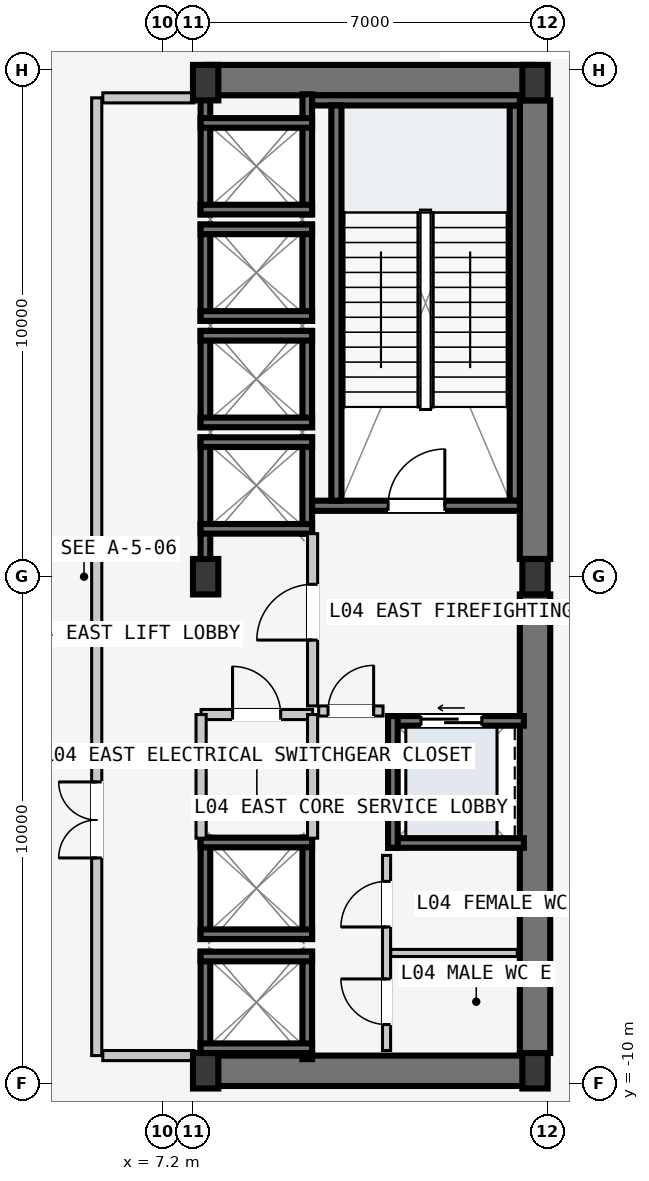
"""IFC4 building model, lengths in metres.
Left out: names, types, materials, properties, quantities, classifications, styles, units other than length and angle.
Written with IfcOpenShell. Run it as: python <this file> out.ifc"""

import sys

from ifc_helpers import new_model, si_unit, direction, frame, frame_2d, origin, origin_2d, place, context, subcontext, project, spatial, rectangle, i_section, extrude, element, fill, save


model = new_model("IFC4")
c1 = context("Model", 3, precision=1e-05, world=origin(), true_north=direction((0.0, 1.0)))
c2 = subcontext(c1, "Body", "Model", "MODEL_VIEW")
j1 = project(units=[si_unit("LENGTHUNIT", "METRE"), si_unit("PLANEANGLEUNIT", "RADIAN")], contexts=[c1])
p1 = place(None, origin())
s1 = spatial("IfcSite", under=j1, at=p1, CompositionType="ELEMENT")
p2 = place(p1, origin())
s2 = spatial("IfcBuilding", under=s1, at=p2, CompositionType="ELEMENT")
p3 = place(p2, frame((0.0, 0.0, 19.2)))
s3 = spatial("IfcBuildingStorey", under=s2, at=p3, CompositionType="ELEMENT", Elevation=19.2)
for number, where, z_axis, x_axis in (
    (1, (8.07, -9.75, -0.22), (0.0, 0.0, 1.0), (1.0, 0.0, 0.0)),
    (2, (8.07, 9.8, -0.22), (0.0, 0.0, 1.0), (1.0, 0.0, 0.0)),
):
    element("IfcWall", number, at=place(p3, frame(where, z_axis=z_axis, x_axis=x_axis)), inside=s3, PredefinedType="SHEAR", context=c2, shape_type="SweptSolid", body=[
        extrude(rectangle(XDim=6.46, YDim=0.6, at=frame_2d((3.23, 0.0))), origin(), (0.0, 0.0, 1.0), 4.82),
    ])
for number, where, z_axis, x_axis in (
    (3, (14.55, -9.4, -0.22), (0.0, 0.0, 1.0), (0.0, 1.0, 0.0)),
    (4, (14.55, 0.35, -0.22), (0.0, 0.0, 1.0), (0.0, 1.0, 0.0)),
):
    element("IfcWall", number, at=place(p3, frame(where, z_axis=z_axis, x_axis=x_axis)), inside=s3, PredefinedType="SHEAR", context=c2, shape_type="SweptSolid", body=[
        extrude(rectangle(XDim=9.05, YDim=0.6, at=frame_2d((4.525, 0.0))), origin(), (0.0, 0.0, 1.0), 4.82),
    ])
p4 = place(p3, frame((14.15, 1.5, -0.22), z_axis=(0.0, 0.0, 1.0), x_axis=(0.0, 1.0, 0.0)))
e5 = element("IfcWall", 5, at=p4, inside=s3, PredefinedType="SOLIDWALL", context=c2, shape_type="SweptSolid", body=[
    extrude(rectangle(XDim=7.8, YDim=0.2, at=frame_2d((3.9, 0.0))), origin(), (0.0, 0.0, 1.0), 4.82),
])
p5 = place(p3, frame((10.15, 1.4, -0.22), z_axis=(0.0, 0.0, 1.0), x_axis=(1.0, 0.0, 0.0)))
e6 = element("IfcWall", 6, at=p5, inside=s3, PredefinedType="SOLIDWALL", context=c2, shape_type="SweptSolid", body=[
    extrude(rectangle(XDim=4.1, YDim=0.2, at=frame_2d((2.05, 0.0))), origin(), (0.0, 0.0, 1.0), 4.82),
])
p6 = place(p5, frame((1.5, 0.0, 0.22)))
e7 = element("IfcOpeningElement", 7, at=p6, cuts=e6, PredefinedType="OPENING", context=c2, shape_type="SweptSolid", body=[
    extrude(rectangle(XDim=1.12, YDim=2.18, at=frame_2d((0.56, 1.09))), frame((0.0, 0.11, 0.0), z_axis=(0.0, -1.0, 0.0), x_axis=(1.0, 0.0, 0.0)), (0.0, 0.0, 1.0), 0.22),
])
p7 = place(p3, frame((10.15, 9.4, -0.22), z_axis=(0.0, 0.0, 1.0), x_axis=(1.0, 0.0, 0.0)))
e8 = element("IfcWall", 8, at=p7, inside=s3, PredefinedType="SOLIDWALL", context=c2, shape_type="SweptSolid", body=[
    extrude(rectangle(XDim=4.1, YDim=0.2, at=frame_2d((2.05, 0.0))), origin(), (0.0, 0.0, 1.0), 4.82),
])
p8 = place(p3, frame((10.63, 1.5, -0.22), z_axis=(0.0, 0.0, 1.0), x_axis=(0.0, 1.0, 0.0)))
e9 = element("IfcWall", 9, at=p8, inside=s3, PredefinedType="SOLIDWALL", context=c2, shape_type="SweptSolid", body=[
    extrude(rectangle(XDim=7.8, YDim=0.2, at=frame_2d((3.9, 0.0))), origin(), (0.0, 0.0, 1.0), 4.82),
])
for number, where, z_axis, x_axis in (
    (10, (8.05, -9.75, 0.0), (0.0, 0.0, 1.0), (1.0, 0.0, 0.0)),
    (11, (8.05, 0.0, 0.0), (0.0, 0.0, 1.0), (1.0, 0.0, 0.0)),
    (12, (8.05, 9.75, 0.0), (0.0, 0.0, 1.0), (1.0, 0.0, 0.0)),
    (13, (14.55, -9.75, 0.0), (0.0, 0.0, 1.0), (1.0, 0.0, 0.0)),
    (14, (14.55, 0.0, 0.0), (0.0, 0.0, 1.0), (1.0, 0.0, 0.0)),
    (15, (14.55, 9.75, 0.0), (0.0, 0.0, 1.0), (1.0, 0.0, 0.0)),
):
    element("IfcColumn", number, at=place(p3, frame(where, z_axis=z_axis, x_axis=x_axis)), inside=s3, PredefinedType="COLUMN", context=c2, shape_type="SweptSolid", body=[
        extrude(i_section(OverallWidth=0.5, OverallDepth=0.7, WebThickness=0.028, FlangeThickness=0.045, at=origin_2d()), origin(), (0.0, 0.0, 1.0), 4.8),
    ])
p9 = place(p3, frame((8.045, 0.21, -0.22), z_axis=(0.0, 0.0, 1.0), x_axis=(0.0, 1.0, 0.0)))
e16 = element("IfcWall", 16, at=p9, inside=s3, PredefinedType="SOLIDWALL", context=c2, shape_type="SweptSolid", body=[
    extrude(rectangle(XDim=2.54, YDim=0.19, at=frame_2d((1.27, 0.0))), origin(), (0.0, 0.0, 1.0), 4.82),
])
p10 = place(p3, frame((10.055, 0.85, -0.22), z_axis=(0.0, 0.0, 1.0), x_axis=(0.0, 1.0, 0.0)))
e17 = element("IfcWall", 17, at=p10, inside=s3, PredefinedType="SOLIDWALL", context=c2, shape_type="SweptSolid", body=[
    extrude(rectangle(XDim=1.9, YDim=0.19, at=frame_2d((0.95, 0.0))), origin(), (0.0, 0.0, 1.0), 4.82),
])
for number, where, z_axis, x_axis in (
    (18, (7.95, 2.655, -0.22), (0.0, 0.0, 1.0), (1.0, 0.0, 0.0)),
    (19, (7.95, 0.945, -0.22), (0.0, 0.0, 1.0), (1.0, 0.0, 0.0)),
):
    element("IfcWall", number, at=place(p3, frame(where, z_axis=z_axis, x_axis=x_axis)), inside=s3, PredefinedType="SOLIDWALL", context=c2, shape_type="SweptSolid", body=[
        extrude(rectangle(XDim=2.2, YDim=0.19, at=frame_2d((1.1, 0.0))), origin(), (0.0, 0.0, 1.0), 4.82),
    ])
for number, where, z_axis, x_axis in (
    (20, (8.045, 2.95, -0.22), (0.0, 0.0, 1.0), (0.0, 1.0, 0.0)),
    (21, (10.055, 2.95, -0.22), (0.0, 0.0, 1.0), (0.0, 1.0, 0.0)),
):
    element("IfcWall", number, at=place(p3, frame(where, z_axis=z_axis, x_axis=x_axis)), inside=s3, PredefinedType="SOLIDWALL", context=c2, shape_type="SweptSolid", body=[
        extrude(rectangle(XDim=1.9, YDim=0.19, at=frame_2d((0.95, 0.0))), origin(), (0.0, 0.0, 1.0), 4.82),
    ])
for number, where, z_axis, x_axis in (
    (22, (7.95, 4.755, -0.22), (0.0, 0.0, 1.0), (1.0, 0.0, 0.0)),
    (23, (7.95, 3.045, -0.22), (0.0, 0.0, 1.0), (1.0, 0.0, 0.0)),
):
    element("IfcWall", number, at=place(p3, frame(where, z_axis=z_axis, x_axis=x_axis)), inside=s3, PredefinedType="SOLIDWALL", context=c2, shape_type="SweptSolid", body=[
        extrude(rectangle(XDim=2.2, YDim=0.19, at=frame_2d((1.1, 0.0))), origin(), (0.0, 0.0, 1.0), 4.82),
    ])
for number, where, z_axis, x_axis in (
    (24, (8.045, 5.05, -0.22), (0.0, 0.0, 1.0), (0.0, 1.0, 0.0)),
    (25, (10.055, 5.05, -0.22), (0.0, 0.0, 1.0), (0.0, 1.0, 0.0)),
):
    element("IfcWall", number, at=place(p3, frame(where, z_axis=z_axis, x_axis=x_axis)), inside=s3, PredefinedType="SOLIDWALL", context=c2, shape_type="SweptSolid", body=[
        extrude(rectangle(XDim=1.9, YDim=0.19, at=frame_2d((0.95, 0.0))), origin(), (0.0, 0.0, 1.0), 4.82),
    ])
for number, where, z_axis, x_axis in (
    (26, (7.95, 6.855, -0.22), (0.0, 0.0, 1.0), (1.0, 0.0, 0.0)),
    (27, (7.95, 5.145, -0.22), (0.0, 0.0, 1.0), (1.0, 0.0, 0.0)),
):
    element("IfcWall", number, at=place(p3, frame(where, z_axis=z_axis, x_axis=x_axis)), inside=s3, PredefinedType="SOLIDWALL", context=c2, shape_type="SweptSolid", body=[
        extrude(rectangle(XDim=2.2, YDim=0.19, at=frame_2d((1.1, 0.0))), origin(), (0.0, 0.0, 1.0), 4.82),
    ])
for number, where, z_axis, x_axis in (
    (28, (8.045, 7.15, -0.22), (0.0, 0.0, 1.0), (0.0, 1.0, 0.0)),
    (29, (10.055, 7.15, -0.22), (0.0, 0.0, 1.0), (0.0, 1.0, 0.0)),
):
    element("IfcWall", number, at=place(p3, frame(where, z_axis=z_axis, x_axis=x_axis)), inside=s3, PredefinedType="SOLIDWALL", context=c2, shape_type="SweptSolid", body=[
        extrude(rectangle(XDim=2.37, YDim=0.19, at=frame_2d((1.185, 0.0))), origin(), (0.0, 0.0, 1.0), 4.82),
    ])
for number, where, z_axis, x_axis in (
    (30, (7.95, 8.955, -0.22), (0.0, 0.0, 1.0), (1.0, 0.0, 0.0)),
    (31, (7.95, 7.245, -0.22), (0.0, 0.0, 1.0), (1.0, 0.0, 0.0)),
):
    element("IfcWall", number, at=place(p3, frame(where, z_axis=z_axis, x_axis=x_axis)), inside=s3, PredefinedType="SOLIDWALL", context=c2, shape_type="SweptSolid", body=[
        extrude(rectangle(XDim=2.2, YDim=0.19, at=frame_2d((1.1, 0.0))), origin(), (0.0, 0.0, 1.0), 4.82),
    ])
for number, where, z_axis, x_axis in (
    (32, (8.045, -9.52, -0.22), (0.0, 0.0, 1.0), (0.0, 1.0, 0.0)),
    (33, (10.055, -9.52, -0.22), (0.0, 0.0, 1.0), (0.0, 1.0, 0.0)),
):
    element("IfcWall", number, at=place(p3, frame(where, z_axis=z_axis, x_axis=x_axis)), inside=s3, PredefinedType="SOLIDWALL", context=c2, shape_type="SweptSolid", body=[
        extrude(rectangle(XDim=2.12, YDim=0.19, at=frame_2d((1.06, 0.0))), origin(), (0.0, 0.0, 1.0), 4.82),
    ])
for number, where, z_axis, x_axis in (
    (34, (7.95, -7.495, -0.22), (0.0, 0.0, 1.0), (1.0, 0.0, 0.0)),
    (35, (7.95, -9.305, -0.22), (0.0, 0.0, 1.0), (1.0, 0.0, 0.0)),
):
    element("IfcWall", number, at=place(p3, frame(where, z_axis=z_axis, x_axis=x_axis)), inside=s3, PredefinedType="SOLIDWALL", context=c2, shape_type="SweptSolid", body=[
        extrude(rectangle(XDim=2.2, YDim=0.19, at=frame_2d((1.1, 0.0))), origin(), (0.0, 0.0, 1.0), 4.82),
    ])
for number, where, z_axis, x_axis in (
    (36, (8.045, -7.15, -0.22), (0.0, 0.0, 1.0), (0.0, 1.0, 0.0)),
    (37, (10.055, -7.15, -0.22), (0.0, 0.0, 1.0), (0.0, 1.0, 0.0)),
):
    element("IfcWall", number, at=place(p3, frame(where, z_axis=z_axis, x_axis=x_axis)), inside=s3, PredefinedType="SOLIDWALL", context=c2, shape_type="SweptSolid", body=[
        extrude(rectangle(XDim=2.0, YDim=0.19, at=frame_2d((1.0, 0.0))), origin(), (0.0, 0.0, 1.0), 4.82),
    ])
for number, where, z_axis, x_axis in (
    (38, (7.95, -5.245, -0.22), (0.0, 0.0, 1.0), (1.0, 0.0, 0.0)),
    (39, (7.95, -7.055, -0.22), (0.0, 0.0, 1.0), (1.0, 0.0, 0.0)),
):
    element("IfcWall", number, at=place(p3, frame(where, z_axis=z_axis, x_axis=x_axis)), inside=s3, PredefinedType="SOLIDWALL", context=c2, shape_type="SweptSolid", body=[
        extrude(rectangle(XDim=2.2, YDim=0.19, at=frame_2d((1.1, 0.0))), origin(), (0.0, 0.0, 1.0), 4.82),
    ])
p11 = place(p3, frame((11.65, -2.845, -0.22), z_axis=(0.0, 0.0, 1.0), x_axis=(1.0, 0.0, 0.0)))
e40 = element("IfcWall", 40, at=p11, inside=s3, PredefinedType="SOLIDWALL", context=c2, shape_type="SweptSolid", body=[
    extrude(rectangle(XDim=2.68, YDim=0.19, at=frame_2d((1.34, 0.0))), origin(), (0.0, 0.0, 1.0), 4.82),
])
p12 = place(p11, frame((0.65, 0.0, 0.22)))
e41 = element("IfcOpeningElement", 41, at=p12, cuts=e40, PredefinedType="OPENING", context=c2, shape_type="SweptSolid", body=[
    extrude(rectangle(XDim=1.2, YDim=2.2, at=frame_2d((0.6, 1.1))), frame((0.0, 0.105, 0.0), z_axis=(0.0, -1.0, 0.0), x_axis=(1.0, 0.0, 0.0)), (0.0, 0.0, 1.0), 0.21),
])
p13 = place(p3, frame((11.65, -5.255, -0.22), z_axis=(0.0, 0.0, 1.0), x_axis=(1.0, 0.0, 0.0)))
e42 = element("IfcWall", 42, at=p13, inside=s3, PredefinedType="SOLIDWALL", context=c2, shape_type="SweptSolid", body=[
    extrude(rectangle(XDim=2.68, YDim=0.19, at=frame_2d((1.34, 0.0))), origin(), (0.0, 0.0, 1.0), 4.82),
])
p14 = place(p3, frame((11.745, -5.35, -0.22), z_axis=(0.0, 0.0, 1.0), x_axis=(0.0, 1.0, 0.0)))
e43 = element("IfcWall", 43, at=p14, inside=s3, PredefinedType="SOLIDWALL", context=c2, shape_type="SweptSolid", body=[
    extrude(rectangle(XDim=2.6, YDim=0.19, at=frame_2d((1.3, 0.0))), origin(), (0.0, 0.0, 1.0), 4.82),
])
p15 = place(p3, frame((5.9, -9.45, 0.0), z_axis=(0.0, 0.0, 1.0), x_axis=(0.0, 1.0, 0.0)))
e44 = element("IfcWall", 44, at=p15, inside=s3, PredefinedType="PARTITIONING", context=c2, shape_type="SweptSolid", body=[
    extrude(rectangle(XDim=18.9, YDim=0.2, at=frame_2d((9.45, 0.0))), origin(), (0.0, 0.0, 1.0), 4.6),
])
p16 = place(p15, frame((3.9, 0.0, 0.0)))
e45 = element("IfcOpeningElement", 45, at=p16, cuts=e44, PredefinedType="OPENING", context=c2, shape_type="SweptSolid", body=[
    extrude(rectangle(XDim=1.5, YDim=2.2, at=frame_2d((0.75, 1.1))), frame((0.0, 0.11, 0.0), z_axis=(0.0, -1.0, 0.0), x_axis=(1.0, 0.0, 0.0)), (0.0, 0.0, 1.0), 0.22),
])
for number, where, z_axis, x_axis in (
    (46, (6.02, -9.45, 0.0), (0.0, 0.0, 1.0), (1.0, 0.0, 0.0)),
    (47, (6.02, 9.45, 0.0), (0.0, 0.0, 1.0), (1.0, 0.0, 0.0)),
):
    element("IfcWall", number, at=place(p3, frame(where, z_axis=z_axis, x_axis=x_axis)), inside=s3, PredefinedType="PARTITIONING", context=c2, shape_type="SweptSolid", body=[
        extrude(rectangle(XDim=1.8, YDim=0.2, at=frame_2d((0.9, 0.0))), origin(), (0.0, 0.0, 1.0), 2.92),
    ])
p17 = place(p3, frame((10.16, -2.55, 0.0), z_axis=(0.0, 0.0, 1.0), x_axis=(0.0, 1.0, 0.0)))
e48 = element("IfcWall", 48, at=p17, inside=s3, PredefinedType="PARTITIONING", context=c2, shape_type="SweptSolid", body=[
    extrude(rectangle(XDim=3.4, YDim=0.2, at=frame_2d((1.7, 0.0))), origin(), (0.0, 0.0, 1.0), 4.6),
])
p18 = place(p17, frame((1.3, 0.0, 0.0)))
e49 = element("IfcOpeningElement", 49, at=p18, cuts=e48, PredefinedType="OPENING", context=c2, shape_type="SweptSolid", body=[
    extrude(rectangle(XDim=1.1, YDim=2.15, at=frame_2d((0.55, 1.075))), frame((0.0, 0.11, 0.0), z_axis=(0.0, -1.0, 0.0), x_axis=(1.0, 0.0, 0.0)), (0.0, 0.0, 1.0), 0.22),
])
p19 = place(p3, frame((10.28, -2.65, 0.0), z_axis=(0.0, 0.0, 1.0), x_axis=(1.0, 0.0, 0.0)))
e50 = element("IfcWall", 50, at=p19, inside=s3, PredefinedType="PARTITIONING", context=c2, shape_type="SweptSolid", body=[
    extrude(rectangle(XDim=1.27, YDim=0.2, at=frame_2d((0.635, 0.0))), origin(), (0.0, 0.0, 1.0), 4.6),
])
p20 = place(p19, frame((0.185, 0.0, 0.0)))
e51 = element("IfcOpeningElement", 51, at=p20, cuts=e50, PredefinedType="OPENING", context=c2, shape_type="SweptSolid", body=[
    extrude(rectangle(XDim=0.9, YDim=2.15, at=frame_2d((0.45, 1.075))), frame((0.0, 0.11, 0.0), z_axis=(0.0, -1.0, 0.0), x_axis=(1.0, 0.0, 0.0)), (0.0, 0.0, 1.0), 0.22),
])
p21 = place(p3, frame((7.96, -2.72, 0.0), z_axis=(0.0, 0.0, 1.0), x_axis=(1.0, 0.0, 0.0)))
e52 = element("IfcWall", 52, at=p21, inside=s3, PredefinedType="PARTITIONING", context=c2, shape_type="SweptSolid", body=[
    extrude(rectangle(XDim=2.2, YDim=0.2, at=frame_2d((1.1, 0.0))), origin(), (0.0, 0.0, 1.0), 4.6),
])
p22 = place(p21, frame((0.62, 0.0, 0.0)))
e53 = element("IfcOpeningElement", 53, at=p22, cuts=e52, PredefinedType="OPENING", context=c2, shape_type="SweptSolid", body=[
    extrude(rectangle(XDim=0.95, YDim=2.1, at=frame_2d((0.475, 1.05))), frame((0.0, 0.11, 0.0), z_axis=(0.0, -1.0, 0.0), x_axis=(1.0, 0.0, 0.0)), (0.0, 0.0, 1.0), 0.22),
])
for number, where, z_axis, x_axis in (
    (54, (7.96, -5.16, 0.0), (0.0, 0.0, 1.0), (0.0, 1.0, 0.0)),
    (55, (10.16, -5.16, 0.0), (0.0, 0.0, 1.0), (0.0, 1.0, 0.0)),
):
    element("IfcWall", number, at=place(p3, frame(where, z_axis=z_axis, x_axis=x_axis)), inside=s3, PredefinedType="PARTITIONING", context=c2, shape_type="SweptSolid", body=[
        extrude(rectangle(XDim=2.44, YDim=0.2, at=frame_2d((1.22, 0.0))), origin(), (0.0, 0.0, 1.0), 4.6),
    ])
p23 = place(p3, frame((11.7, -7.425, 0.0), z_axis=(0.0, 0.0, 1.0), x_axis=(1.0, 0.0, 0.0)))
e56 = element("IfcWall", 56, at=p23, inside=s3, PredefinedType="PARTITIONING", context=c2, shape_type="SweptSolid", body=[
    extrude(rectangle(XDim=2.5, YDim=0.14, at=frame_2d((1.25, 0.0))), origin(), (0.0, 0.0, 1.0), 4.6),
])
p24 = place(p3, frame((11.62, -9.35, 0.0), z_axis=(0.0, 0.0, 1.0), x_axis=(0.0, 1.0, 0.0)))
e57 = element("IfcWall", 57, at=p24, inside=s3, PredefinedType="PARTITIONING", context=c2, shape_type="SweptSolid", body=[
    extrude(rectangle(XDim=3.85, YDim=0.16, at=frame_2d((1.925, 0.0))), origin(), (0.0, 0.0, 1.0), 4.6),
])
p25 = place(p24, frame((0.512, 0.0, 0.0)))
e58 = element("IfcOpeningElement", 58, at=p25, cuts=e57, PredefinedType="OPENING", context=c2, shape_type="SweptSolid", body=[
    extrude(rectangle(XDim=0.9, YDim=2.15, at=frame_2d((0.45, 1.075))), frame((0.0, 0.09, 0.0), z_axis=(0.0, -1.0, 0.0), x_axis=(1.0, 0.0, 0.0)), (0.0, 0.0, 1.0), 0.18),
])
p26 = place(p24, frame((2.438, 0.0, 0.0)))
e59 = element("IfcOpeningElement", 59, at=p26, cuts=e57, PredefinedType="OPENING", context=c2, shape_type="SweptSolid", body=[
    extrude(rectangle(XDim=0.9, YDim=2.15, at=frame_2d((0.45, 1.075))), frame((0.0, 0.09, 0.0), z_axis=(0.0, -1.0, 0.0), x_axis=(1.0, 0.0, 0.0)), (0.0, 0.0, 1.0), 0.18),
])
p27 = place(p6, origin())
e60 = element("IfcDoor", 60, at=p27, inside=s3, OperationType="SINGLE_SWING_RIGHT", PredefinedType="DOOR", context=c2, shape_type="SweptSolid", body=[
    extrude(rectangle(XDim=1.12, YDim=2.18, at=frame_2d((0.56, 1.09))), frame((0.0, 0.025, 0.0), z_axis=(0.0, -1.0, 0.0), x_axis=(1.0, 0.0, 0.0)), (0.0, 0.0, 1.0), 0.05),
])
fill(e7, e60)
p28 = place(p12, origin())
e61 = element("IfcDoor", 61, at=p28, inside=s3, OperationType="SLIDING_TO_LEFT", PredefinedType="DOOR", context=c2, shape_type="SweptSolid", body=[
    extrude(rectangle(XDim=1.2, YDim=2.2, at=frame_2d((0.6, 1.1))), frame((0.0, 0.025, 0.0), z_axis=(0.0, -1.0, 0.0), x_axis=(1.0, 0.0, 0.0)), (0.0, 0.0, 1.0), 0.05),
])
fill(e41, e61)
p29 = place(p16, origin())
e62 = element("IfcDoor", 62, at=p29, inside=s3, OperationType="DOUBLE_DOOR_SINGLE_SWING", PredefinedType="DOOR", context=c2, shape_type="SweptSolid", body=[
    extrude(rectangle(XDim=1.5, YDim=2.2, at=frame_2d((0.75, 1.1))), frame((0.0, 0.025, 0.0), z_axis=(0.0, -1.0, 0.0), x_axis=(1.0, 0.0, 0.0)), (0.0, 0.0, 1.0), 0.05),
])
fill(e45, e62)
p30 = place(p18, origin())
e63 = element("IfcDoor", 63, at=p30, inside=s3, OperationType="SINGLE_SWING_LEFT", PredefinedType="DOOR", context=c2, shape_type="SweptSolid", body=[
    extrude(rectangle(XDim=1.1, YDim=2.15, at=frame_2d((0.55, 1.075))), frame((0.0, 0.025, 0.0), z_axis=(0.0, -1.0, 0.0), x_axis=(1.0, 0.0, 0.0)), (0.0, 0.0, 1.0), 0.05),
])
fill(e49, e63)
p31 = place(p20, origin())
e64 = element("IfcDoor", 64, at=p31, inside=s3, OperationType="SINGLE_SWING_RIGHT", PredefinedType="DOOR", context=c2, shape_type="SweptSolid", body=[
    extrude(rectangle(XDim=0.9, YDim=2.15, at=frame_2d((0.45, 1.075))), frame((0.0, 0.025, 0.0), z_axis=(0.0, -1.0, 0.0), x_axis=(1.0, 0.0, 0.0)), (0.0, 0.0, 1.0), 0.05),
])
fill(e51, e64)
p32 = place(p22, origin())
e65 = element("IfcDoor", 65, at=p32, inside=s3, OperationType="SINGLE_SWING_LEFT", PredefinedType="DOOR", context=c2, shape_type="SweptSolid", body=[
    extrude(rectangle(XDim=0.95, YDim=2.1, at=frame_2d((0.475, 1.05))), frame((0.0, 0.025, 0.0), z_axis=(0.0, -1.0, 0.0), x_axis=(1.0, 0.0, 0.0)), (0.0, 0.0, 1.0), 0.05),
])
fill(e53, e65)
p33 = place(p25, origin())
e66 = element("IfcDoor", 66, at=p33, inside=s3, OperationType="SINGLE_SWING_RIGHT", PredefinedType="DOOR", context=c2, shape_type="SweptSolid", body=[
    extrude(rectangle(XDim=0.9, YDim=2.15, at=frame_2d((0.45, 1.075))), frame((0.0, 0.025, 0.0), z_axis=(0.0, -1.0, 0.0), x_axis=(1.0, 0.0, 0.0)), (0.0, 0.0, 1.0), 0.05),
])
fill(e58, e66)
p34 = place(p26, origin())
e67 = element("IfcDoor", 67, at=p34, inside=s3, OperationType="SINGLE_SWING_LEFT", PredefinedType="DOOR", context=c2, shape_type="SweptSolid", body=[
    extrude(rectangle(XDim=0.9, YDim=2.15, at=frame_2d((0.45, 1.075))), frame((0.0, 0.025, 0.0), z_axis=(0.0, -1.0, 0.0), x_axis=(1.0, 0.0, 0.0)), (0.0, 0.0, 1.0), 0.05),
])
fill(e59, e67)
save(model, sys.argv[1])
